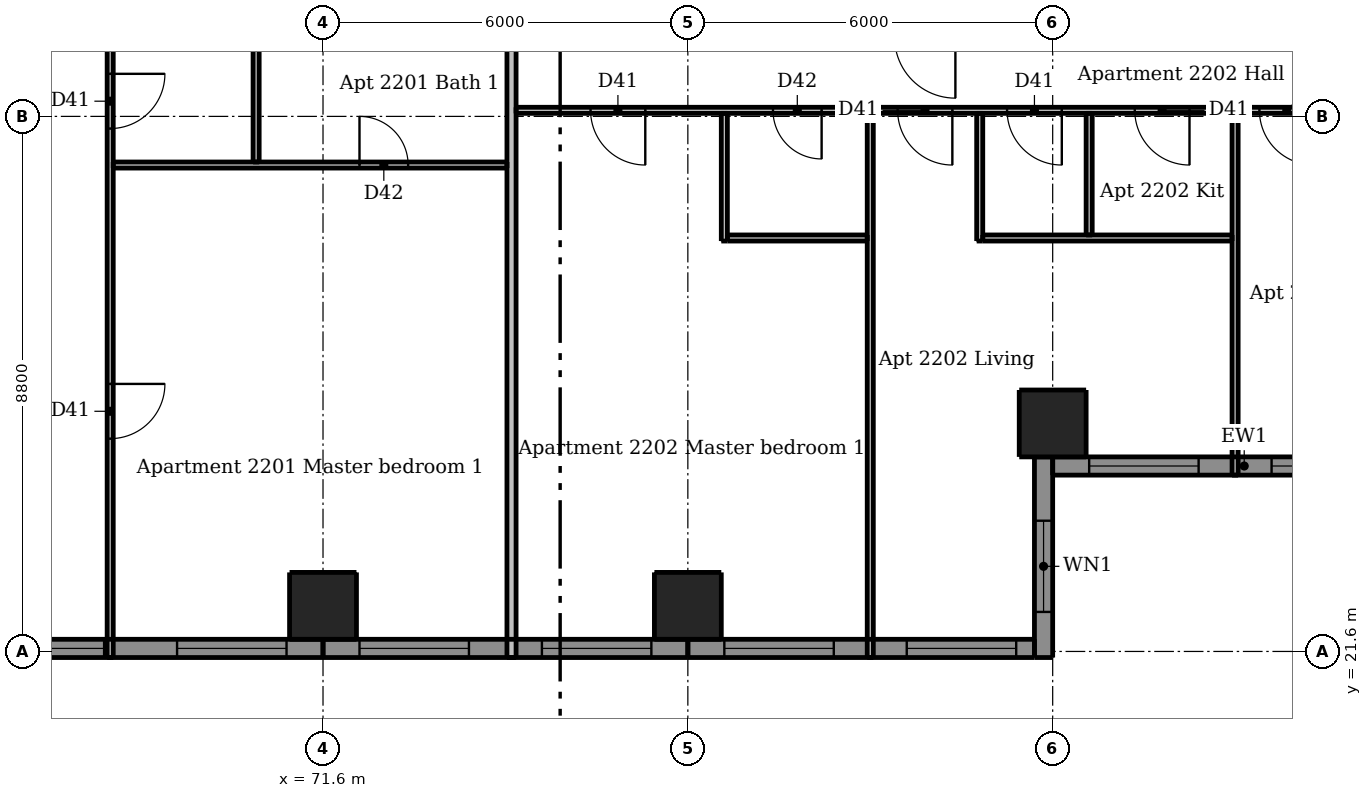
"""IFC4 building model, lengths in metres.
Left out: names, types, materials, properties, quantities, classifications, styles, units other than length and angle.
Written with IfcOpenShell. Run it as: python <this file> out.ifc"""

import sys

from ifc_helpers import new_model, si_unit, direction, frame, frame_2d, origin, origin_2d, place, context, subcontext, project, spatial, rectangle, extrude, element, fill, save


model = new_model("IFC4")
c1 = context("Model", 3, precision=1e-05, world=origin(), true_north=direction((0.0, 1.0)))
c2 = subcontext(c1, "Body", "Model", "MODEL_VIEW")
j1 = project(units=[si_unit("LENGTHUNIT", "METRE"), si_unit("PLANEANGLEUNIT", "RADIAN")], contexts=[c1])
p1 = place(None, origin())
s1 = spatial("IfcSite", under=j1, at=p1, CompositionType="ELEMENT")
p2 = place(p1, origin())
s2 = spatial("IfcBuilding", under=s1, at=p2, CompositionType="ELEMENT")
p3 = place(p2, frame((0.0, 0.0, 85.3)))
s3 = spatial("IfcBuildingStorey", under=s2, at=p3, CompositionType="ELEMENT", Elevation=85.3)
for number, where, z_axis, x_axis in (
    (1, (71.6, 22.35, 0.0), (0.0, 0.0, 1.0), (1.0, 0.0, 0.0)),
    (2, (77.6, 22.35, 0.0), (0.0, 0.0, 1.0), (1.0, 0.0, 0.0)),
    (3, (83.6, 25.35, 0.0), (0.0, 0.0, 1.0), (1.0, 0.0, 0.0)),
):
    element("IfcColumn", number, at=place(p3, frame(where, z_axis=z_axis, x_axis=x_axis)), inside=s3, PredefinedType="COLUMN", context=c2, shape_type="SweptSolid", body=[
        extrude(rectangle(XDim=1.1, YDim=1.1, at=origin_2d()), origin(), (0.0, 0.0, 1.0), 3.05),
    ])
p4 = place(p3, frame((83.45, 21.5, 0.0), z_axis=(0.0, 0.0, 1.0), x_axis=(0.0, 1.0, 0.0)))
e4 = element("IfcWall", 4, at=p4, inside=s3, PredefinedType="SOLIDWALL", context=c2, shape_type="SweptSolid", body=[
    extrude(rectangle(XDim=3.3, YDim=0.3, at=frame_2d((1.65, 0.0))), origin(), (0.0, 0.0, 1.0), 3.05),
])
p5 = place(p4, frame((0.75, 0.0, 0.9)))
e5 = element("IfcOpeningElement", 5, at=p5, cuts=e4, PredefinedType="OPENING", context=c2, shape_type="SweptSolid", body=[
    extrude(rectangle(XDim=1.5, YDim=1.5, at=frame_2d((0.75, 0.75))), frame((0.0, 0.16, 0.0), z_axis=(0.0, -1.0, 0.0), x_axis=(1.0, 0.0, 0.0)), (0.0, 0.0, 1.0), 0.32),
])
p6 = place(p3, frame((65.6, 21.65, 0.0), z_axis=(0.0, 0.0, 1.0), x_axis=(1.0, 0.0, 0.0)))
e6 = element("IfcWall", 6, at=p6, inside=s3, PredefinedType="SOLIDWALL", context=c2, shape_type="SweptSolid", body=[
    extrude(rectangle(XDim=6.0, YDim=0.3, at=frame_2d((3.0, 0.0))), origin(), (0.0, 0.0, 1.0), 3.05),
])
p7 = place(p6, frame((0.6, 0.0, 0.15)))
e7 = element("IfcOpeningElement", 7, at=p7, cuts=e6, PredefinedType="OPENING", context=c2, shape_type="SweptSolid", body=[
    extrude(rectangle(XDim=1.8, YDim=2.1, at=frame_2d((0.9, 1.05))), frame((0.0, 0.16, 0.0), z_axis=(0.0, -1.0, 0.0), x_axis=(1.0, 0.0, 0.0)), (0.0, 0.0, 1.0), 0.32),
])
p8 = place(p6, frame((3.6, 0.0, 0.15)))
e8 = element("IfcOpeningElement", 8, at=p8, cuts=e6, PredefinedType="OPENING", context=c2, shape_type="SweptSolid", body=[
    extrude(rectangle(XDim=1.8, YDim=2.1, at=frame_2d((0.9, 1.05))), frame((0.0, 0.16, 0.0), z_axis=(0.0, -1.0, 0.0), x_axis=(1.0, 0.0, 0.0)), (0.0, 0.0, 1.0), 0.32),
])
p9 = place(p3, frame((71.6, 21.65, 0.0), z_axis=(0.0, 0.0, 1.0), x_axis=(1.0, 0.0, 0.0)))
e9 = element("IfcWall", 9, at=p9, inside=s3, PredefinedType="SOLIDWALL", context=c2, shape_type="SweptSolid", body=[
    extrude(rectangle(XDim=6.0, YDim=0.3, at=frame_2d((3.0, 0.0))), origin(), (0.0, 0.0, 1.0), 3.05),
])
p10 = place(p9, frame((0.6, 0.0, 0.15)))
e10 = element("IfcOpeningElement", 10, at=p10, cuts=e9, PredefinedType="OPENING", context=c2, shape_type="SweptSolid", body=[
    extrude(rectangle(XDim=1.8, YDim=2.1, at=frame_2d((0.9, 1.05))), frame((0.0, 0.16, 0.0), z_axis=(0.0, -1.0, 0.0), x_axis=(1.0, 0.0, 0.0)), (0.0, 0.0, 1.0), 0.32),
])
p11 = place(p9, frame((3.6, 0.0, 0.15)))
e11 = element("IfcOpeningElement", 11, at=p11, cuts=e9, PredefinedType="OPENING", context=c2, shape_type="SweptSolid", body=[
    extrude(rectangle(XDim=1.8, YDim=2.1, at=frame_2d((0.9, 1.05))), frame((0.0, 0.16, 0.0), z_axis=(0.0, -1.0, 0.0), x_axis=(1.0, 0.0, 0.0)), (0.0, 0.0, 1.0), 0.32),
])
p12 = place(p3, frame((77.6, 21.65, 0.0), z_axis=(0.0, 0.0, 1.0), x_axis=(1.0, 0.0, 0.0)))
e12 = element("IfcWall", 12, at=p12, inside=s3, PredefinedType="SOLIDWALL", context=c2, shape_type="SweptSolid", body=[
    extrude(rectangle(XDim=5.7, YDim=0.3, at=frame_2d((2.85, 0.0))), origin(), (0.0, 0.0, 1.0), 3.05),
])
p13 = place(p12, frame((0.6, 0.0, 0.15)))
e13 = element("IfcOpeningElement", 13, at=p13, cuts=e12, PredefinedType="OPENING", context=c2, shape_type="SweptSolid", body=[
    extrude(rectangle(XDim=1.8, YDim=2.1, at=frame_2d((0.9, 1.05))), frame((0.0, 0.16, 0.0), z_axis=(0.0, -1.0, 0.0), x_axis=(1.0, 0.0, 0.0)), (0.0, 0.0, 1.0), 0.32),
])
p14 = place(p12, frame((3.6, 0.0, 0.15)))
e14 = element("IfcOpeningElement", 14, at=p14, cuts=e12, PredefinedType="OPENING", context=c2, shape_type="SweptSolid", body=[
    extrude(rectangle(XDim=1.8, YDim=2.1, at=frame_2d((0.9, 1.05))), frame((0.0, 0.16, 0.0), z_axis=(0.0, -1.0, 0.0), x_axis=(1.0, 0.0, 0.0)), (0.0, 0.0, 1.0), 0.32),
])
p15 = place(p3, frame((83.6, 24.65, 0.0), z_axis=(0.0, 0.0, 1.0), x_axis=(1.0, 0.0, 0.0)))
e15 = element("IfcWall", 15, at=p15, inside=s3, PredefinedType="SOLIDWALL", context=c2, shape_type="SweptSolid", body=[
    extrude(rectangle(XDim=6.3, YDim=0.3, at=frame_2d((3.15, 0.0))), origin(), (0.0, 0.0, 1.0), 3.05),
])
p16 = place(p15, frame((0.6, 0.0, 0.15)))
e16 = element("IfcOpeningElement", 16, at=p16, cuts=e15, PredefinedType="OPENING", context=c2, shape_type="SweptSolid", body=[
    extrude(rectangle(XDim=1.8, YDim=2.1, at=frame_2d((0.9, 1.05))), frame((0.0, 0.16, 0.0), z_axis=(0.0, -1.0, 0.0), x_axis=(1.0, 0.0, 0.0)), (0.0, 0.0, 1.0), 0.32),
])
p17 = place(p15, frame((3.6, 0.0, 0.15)))
e17 = element("IfcOpeningElement", 17, at=p17, cuts=e15, PredefinedType="OPENING", context=c2, shape_type="SweptSolid", body=[
    extrude(rectangle(XDim=1.8, YDim=2.1, at=frame_2d((0.9, 1.05))), frame((0.0, 0.16, 0.0), z_axis=(0.0, -1.0, 0.0), x_axis=(1.0, 0.0, 0.0)), (0.0, 0.0, 1.0), 0.32),
])
p18 = place(p3, frame((68.1, 31.625, 0.0), z_axis=(0.0, 0.0, 1.0), x_axis=(0.0, -1.0, 0.0)))
e18 = element("IfcWall", 18, at=p18, inside=s3, PredefinedType="PARTITIONING", context=c2, shape_type="SweptSolid", body=[
    extrude(rectangle(XDim=10.125, YDim=0.1, at=frame_2d((5.062, 0.0))), origin(), (0.0, 0.0, 1.0), 3.05),
])
p19 = place(p18, frame((0.525, 0.0, 0.0)))
e19 = element("IfcOpeningElement", 19, at=p19, cuts=e18, PredefinedType="OPENING", context=c2, shape_type="SweptSolid", body=[
    extrude(rectangle(XDim=0.9, YDim=2.1, at=frame_2d((0.45, 1.05))), frame((0.0, 0.06, 0.0), z_axis=(0.0, -1.0, 0.0), x_axis=(1.0, 0.0, 0.0)), (0.0, 0.0, 1.0), 0.12),
])
p20 = place(p18, frame((5.625, 0.0, 0.0)))
e20 = element("IfcOpeningElement", 20, at=p20, cuts=e18, PredefinedType="OPENING", context=c2, shape_type="SweptSolid", body=[
    extrude(rectangle(XDim=0.9, YDim=2.1, at=frame_2d((0.45, 1.05))), frame((0.0, 0.06, 0.0), z_axis=(0.0, -1.0, 0.0), x_axis=(1.0, 0.0, 0.0)), (0.0, 0.0, 1.0), 0.12),
])
p21 = place(p3, frame((70.5, 29.65, 0.0), z_axis=(0.0, 0.0, 1.0), x_axis=(0.0, 1.0, 0.0)))
e21 = element("IfcWall", 21, at=p21, inside=s3, PredefinedType="PARTITIONING", context=c2, shape_type="SweptSolid", body=[
    extrude(rectangle(XDim=1.975, YDim=0.1, at=frame_2d((0.988, 0.0))), origin(), (0.0, 0.0, 1.0), 3.05),
])
p22 = place(p3, frame((78.2, 28.35, 0.0), z_axis=(0.0, 0.0, 1.0), x_axis=(0.0, 1.0, 0.0)))
e22 = element("IfcWall", 22, at=p22, inside=s3, PredefinedType="PARTITIONING", context=c2, shape_type="SweptSolid", body=[
    extrude(rectangle(XDim=2.1, YDim=0.1, at=frame_2d((1.05, 0.0))), origin(), (0.0, 0.0, 1.0), 3.05),
])
p23 = place(p3, frame((80.6, 21.5, 0.0), z_axis=(0.0, 0.0, 1.0), x_axis=(0.0, 1.0, 0.0)))
e23 = element("IfcWall", 23, at=p23, inside=s3, PredefinedType="PARTITIONING", context=c2, shape_type="SweptSolid", body=[
    extrude(rectangle(XDim=8.95, YDim=0.1, at=frame_2d((4.475, 0.0))), origin(), (0.0, 0.0, 1.0), 3.05),
])
p24 = place(p3, frame((82.4, 28.35, 0.0), z_axis=(0.0, 0.0, 1.0), x_axis=(0.0, 1.0, 0.0)))
e24 = element("IfcWall", 24, at=p24, inside=s3, PredefinedType="PARTITIONING", context=c2, shape_type="SweptSolid", body=[
    extrude(rectangle(XDim=2.1, YDim=0.1, at=frame_2d((1.05, 0.0))), origin(), (0.0, 0.0, 1.0), 3.05),
])
p25 = place(p3, frame((84.2, 28.45, 0.0), z_axis=(0.0, 0.0, 1.0), x_axis=(0.0, 1.0, 0.0)))
e25 = element("IfcWall", 25, at=p25, inside=s3, PredefinedType="PARTITIONING", context=c2, shape_type="SweptSolid", body=[
    extrude(rectangle(XDim=2.0, YDim=0.1, at=frame_2d((1.0, 0.0))), origin(), (0.0, 0.0, 1.0), 3.05),
])
p26 = place(p3, frame((86.6, 24.5, 0.0), z_axis=(0.0, 0.0, 1.0), x_axis=(0.0, 1.0, 0.0)))
e26 = element("IfcWall", 26, at=p26, inside=s3, PredefinedType="PARTITIONING", context=c2, shape_type="SweptSolid", body=[
    extrude(rectangle(XDim=5.95, YDim=0.1, at=frame_2d((2.975, 0.0))), origin(), (0.0, 0.0, 1.0), 3.05),
])
p27 = place(p3, frame((88.25, 30.5, 0.0), z_axis=(0.0, 0.0, 1.0), x_axis=(-1.0, 0.0, 0.0)))
e27 = element("IfcWall", 27, at=p27, inside=s3, PredefinedType="PARTITIONING", context=c2, shape_type="SweptSolid", body=[
    extrude(rectangle(XDim=13.475, YDim=0.1, at=frame_2d((6.738, 0.0))), origin(), (0.0, 0.0, 1.0), 3.05),
])
p28 = place(p27, frame((6.3, 0.0, 0.0)))
e28 = element("IfcOpeningElement", 28, at=p28, cuts=e27, PredefinedType="OPENING", context=c2, shape_type="SweptSolid", body=[
    extrude(rectangle(XDim=0.9, YDim=2.1, at=frame_2d((0.45, 1.05))), frame((0.0, 0.06, 0.0), z_axis=(0.0, -1.0, 0.0), x_axis=(1.0, 0.0, 0.0)), (0.0, 0.0, 1.0), 0.12),
])
p29 = place(p27, frame((2.4, 0.0, 0.0)))
e29 = element("IfcOpeningElement", 29, at=p29, cuts=e27, PredefinedType="OPENING", context=c2, shape_type="SweptSolid", body=[
    extrude(rectangle(XDim=0.9, YDim=2.1, at=frame_2d((0.45, 1.05))), frame((0.0, 0.06, 0.0), z_axis=(0.0, -1.0, 0.0), x_axis=(1.0, 0.0, 0.0)), (0.0, 0.0, 1.0), 0.12),
])
p30 = place(p27, frame((4.5, 0.0, 0.0)))
e30 = element("IfcOpeningElement", 30, at=p30, cuts=e27, PredefinedType="OPENING", context=c2, shape_type="SweptSolid", body=[
    extrude(rectangle(XDim=0.9, YDim=2.1, at=frame_2d((0.45, 1.05))), frame((0.0, 0.06, 0.0), z_axis=(0.0, -1.0, 0.0), x_axis=(1.0, 0.0, 0.0)), (0.0, 0.0, 1.0), 0.12),
])
p31 = place(p27, frame((11.35, 0.0, 0.0)))
e31 = element("IfcOpeningElement", 31, at=p31, cuts=e27, PredefinedType="OPENING", context=c2, shape_type="SweptSolid", body=[
    extrude(rectangle(XDim=0.9, YDim=2.1, at=frame_2d((0.45, 1.05))), frame((0.0, 0.06, 0.0), z_axis=(0.0, -1.0, 0.0), x_axis=(1.0, 0.0, 0.0)), (0.0, 0.0, 1.0), 0.12),
])
p32 = place(p27, frame((0.35, 0.0, 0.0)))
e32 = element("IfcOpeningElement", 32, at=p32, cuts=e27, PredefinedType="OPENING", context=c2, shape_type="SweptSolid", body=[
    extrude(rectangle(XDim=0.9, YDim=2.1, at=frame_2d((0.45, 1.05))), frame((0.0, 0.06, 0.0), z_axis=(0.0, -1.0, 0.0), x_axis=(1.0, 0.0, 0.0)), (0.0, 0.0, 1.0), 0.12),
])
p33 = place(p27, frame((8.45, 0.0, 0.0)))
e33 = element("IfcOpeningElement", 33, at=p33, cuts=e27, PredefinedType="OPENING", context=c2, shape_type="SweptSolid", body=[
    extrude(rectangle(XDim=0.8, YDim=2.1, at=frame_2d((0.4, 1.05))), frame((0.0, 0.06, 0.0), z_axis=(0.0, -1.0, 0.0), x_axis=(1.0, 0.0, 0.0)), (0.0, 0.0, 1.0), 0.12),
])
p34 = place(p3, frame((68.15, 29.6, 0.0), z_axis=(0.0, 0.0, 1.0), x_axis=(1.0, 0.0, 0.0)))
e34 = element("IfcWall", 34, at=p34, inside=s3, PredefinedType="PARTITIONING", context=c2, shape_type="SweptSolid", body=[
    extrude(rectangle(XDim=6.475, YDim=0.1, at=frame_2d((3.238, 0.0))), origin(), (0.0, 0.0, 1.0), 3.05),
])
p35 = place(p34, frame((4.05, 0.0, 0.0)))
e35 = element("IfcOpeningElement", 35, at=p35, cuts=e34, PredefinedType="OPENING", context=c2, shape_type="SweptSolid", body=[
    extrude(rectangle(XDim=0.8, YDim=2.1, at=frame_2d((0.4, 1.05))), frame((0.0, 0.06, 0.0), z_axis=(0.0, -1.0, 0.0), x_axis=(1.0, 0.0, 0.0)), (0.0, 0.0, 1.0), 0.12),
])
p36 = place(p3, frame((78.25, 28.4, 0.0), z_axis=(0.0, 0.0, 1.0), x_axis=(1.0, 0.0, 0.0)))
e36 = element("IfcWall", 36, at=p36, inside=s3, PredefinedType="PARTITIONING", context=c2, shape_type="SweptSolid", body=[
    extrude(rectangle(XDim=2.3, YDim=0.1, at=frame_2d((1.15, 0.0))), origin(), (0.0, 0.0, 1.0), 3.05),
])
p37 = place(p3, frame((82.45, 28.4, 0.0), z_axis=(0.0, 0.0, 1.0), x_axis=(1.0, 0.0, 0.0)))
e37 = element("IfcWall", 37, at=p37, inside=s3, PredefinedType="PARTITIONING", context=c2, shape_type="SweptSolid", body=[
    extrude(rectangle(XDim=4.1, YDim=0.1, at=frame_2d((2.05, 0.0))), origin(), (0.0, 0.0, 1.0), 3.05),
])
p38 = place(p3, frame((74.7, 21.5, 0.0), z_axis=(0.0, 0.0, 1.0), x_axis=(0.0, 1.0, 0.0)))
e38 = element("IfcWall", 38, at=p38, inside=s3, PredefinedType="PARTITIONING", context=c2, shape_type="SweptSolid", body=[
    extrude(rectangle(XDim=10.125, YDim=0.15, at=frame_2d((5.062, 0.0))), origin(), (0.0, 0.0, 1.0), 3.05),
])
p39 = place(p5, origin())
e39 = element("IfcWindow", 39, at=p39, inside=s3, PartitioningType="DOUBLE_PANEL_VERTICAL", PredefinedType="WINDOW", context=c2, shape_type="SweptSolid", body=[
    extrude(rectangle(XDim=1.5, YDim=1.5, at=frame_2d((0.75, 0.75))), frame((0.0, 0.03, 0.0), z_axis=(0.0, -1.0, 0.0), x_axis=(1.0, 0.0, 0.0)), (0.0, 0.0, 1.0), 0.06),
])
fill(e5, e39)
p40 = place(p7, origin())
e40 = element("IfcWindow", 40, at=p40, inside=s3, PartitioningType="DOUBLE_PANEL_VERTICAL", PredefinedType="WINDOW", context=c2, shape_type="SweptSolid", body=[
    extrude(rectangle(XDim=1.8, YDim=2.1, at=frame_2d((0.9, 1.05))), frame((0.0, 0.03, 0.0), z_axis=(0.0, -1.0, 0.0), x_axis=(1.0, 0.0, 0.0)), (0.0, 0.0, 1.0), 0.06),
])
fill(e7, e40)
p41 = place(p8, origin())
e41 = element("IfcWindow", 41, at=p41, inside=s3, PartitioningType="DOUBLE_PANEL_VERTICAL", PredefinedType="WINDOW", context=c2, shape_type="SweptSolid", body=[
    extrude(rectangle(XDim=1.8, YDim=2.1, at=frame_2d((0.9, 1.05))), frame((0.0, 0.03, 0.0), z_axis=(0.0, -1.0, 0.0), x_axis=(1.0, 0.0, 0.0)), (0.0, 0.0, 1.0), 0.06),
])
fill(e8, e41)
p42 = place(p10, origin())
e42 = element("IfcWindow", 42, at=p42, inside=s3, PartitioningType="DOUBLE_PANEL_VERTICAL", PredefinedType="WINDOW", context=c2, shape_type="SweptSolid", body=[
    extrude(rectangle(XDim=1.8, YDim=2.1, at=frame_2d((0.9, 1.05))), frame((0.0, 0.03, 0.0), z_axis=(0.0, -1.0, 0.0), x_axis=(1.0, 0.0, 0.0)), (0.0, 0.0, 1.0), 0.06),
])
fill(e10, e42)
p43 = place(p11, origin())
e43 = element("IfcWindow", 43, at=p43, inside=s3, PartitioningType="DOUBLE_PANEL_VERTICAL", PredefinedType="WINDOW", context=c2, shape_type="SweptSolid", body=[
    extrude(rectangle(XDim=1.8, YDim=2.1, at=frame_2d((0.9, 1.05))), frame((0.0, 0.03, 0.0), z_axis=(0.0, -1.0, 0.0), x_axis=(1.0, 0.0, 0.0)), (0.0, 0.0, 1.0), 0.06),
])
fill(e11, e43)
p44 = place(p13, origin())
e44 = element("IfcWindow", 44, at=p44, inside=s3, PartitioningType="DOUBLE_PANEL_VERTICAL", PredefinedType="WINDOW", context=c2, shape_type="SweptSolid", body=[
    extrude(rectangle(XDim=1.8, YDim=2.1, at=frame_2d((0.9, 1.05))), frame((0.0, 0.03, 0.0), z_axis=(0.0, -1.0, 0.0), x_axis=(1.0, 0.0, 0.0)), (0.0, 0.0, 1.0), 0.06),
])
fill(e13, e44)
p45 = place(p14, origin())
e45 = element("IfcWindow", 45, at=p45, inside=s3, PartitioningType="DOUBLE_PANEL_VERTICAL", PredefinedType="WINDOW", context=c2, shape_type="SweptSolid", body=[
    extrude(rectangle(XDim=1.8, YDim=2.1, at=frame_2d((0.9, 1.05))), frame((0.0, 0.03, 0.0), z_axis=(0.0, -1.0, 0.0), x_axis=(1.0, 0.0, 0.0)), (0.0, 0.0, 1.0), 0.06),
])
fill(e14, e45)
p46 = place(p16, origin())
e46 = element("IfcWindow", 46, at=p46, inside=s3, PartitioningType="DOUBLE_PANEL_VERTICAL", PredefinedType="WINDOW", context=c2, shape_type="SweptSolid", body=[
    extrude(rectangle(XDim=1.8, YDim=2.1, at=frame_2d((0.9, 1.05))), frame((0.0, 0.03, 0.0), z_axis=(0.0, -1.0, 0.0), x_axis=(1.0, 0.0, 0.0)), (0.0, 0.0, 1.0), 0.06),
])
fill(e16, e46)
p47 = place(p17, origin())
e47 = element("IfcWindow", 47, at=p47, inside=s3, PartitioningType="DOUBLE_PANEL_VERTICAL", PredefinedType="WINDOW", context=c2, shape_type="SweptSolid", body=[
    extrude(rectangle(XDim=1.8, YDim=2.1, at=frame_2d((0.9, 1.05))), frame((0.0, 0.03, 0.0), z_axis=(0.0, -1.0, 0.0), x_axis=(1.0, 0.0, 0.0)), (0.0, 0.0, 1.0), 0.06),
])
fill(e17, e47)
p48 = place(p19, origin())
e48 = element("IfcDoor", 48, at=p48, inside=s3, OperationType="SINGLE_SWING_LEFT", PredefinedType="DOOR", context=c2, shape_type="SweptSolid", body=[
    extrude(rectangle(XDim=0.9, YDim=2.1, at=frame_2d((0.45, 1.05))), frame((0.0, 0.025, 0.0), z_axis=(0.0, -1.0, 0.0), x_axis=(1.0, 0.0, 0.0)), (0.0, 0.0, 1.0), 0.05),
])
fill(e19, e48)
p49 = place(p20, origin())
e49 = element("IfcDoor", 49, at=p49, inside=s3, OperationType="SINGLE_SWING_LEFT", PredefinedType="DOOR", context=c2, shape_type="SweptSolid", body=[
    extrude(rectangle(XDim=0.9, YDim=2.1, at=frame_2d((0.45, 1.05))), frame((0.0, 0.025, 0.0), z_axis=(0.0, -1.0, 0.0), x_axis=(1.0, 0.0, 0.0)), (0.0, 0.0, 1.0), 0.05),
])
fill(e20, e49)
p50 = place(p35, origin())
e50 = element("IfcDoor", 50, at=p50, inside=s3, OperationType="SINGLE_SWING_LEFT", PredefinedType="DOOR", context=c2, shape_type="SweptSolid", body=[
    extrude(rectangle(XDim=0.8, YDim=2.1, at=frame_2d((0.4, 1.05))), frame((0.0, 0.025, 0.0), z_axis=(0.0, -1.0, 0.0), x_axis=(1.0, 0.0, 0.0)), (0.0, 0.0, 1.0), 0.05),
])
fill(e35, e50)
p51 = place(p28, origin())
e51 = element("IfcDoor", 51, at=p51, inside=s3, OperationType="SINGLE_SWING_LEFT", PredefinedType="DOOR", context=c2, shape_type="SweptSolid", body=[
    extrude(rectangle(XDim=0.9, YDim=2.1, at=frame_2d((0.45, 1.05))), frame((0.0, 0.025, 0.0), z_axis=(0.0, -1.0, 0.0), x_axis=(1.0, 0.0, 0.0)), (0.0, 0.0, 1.0), 0.05),
])
fill(e28, e51)
p52 = place(p29, origin())
e52 = element("IfcDoor", 52, at=p52, inside=s3, OperationType="SINGLE_SWING_LEFT", PredefinedType="DOOR", context=c2, shape_type="SweptSolid", body=[
    extrude(rectangle(XDim=0.9, YDim=2.1, at=frame_2d((0.45, 1.05))), frame((0.0, 0.025, 0.0), z_axis=(0.0, -1.0, 0.0), x_axis=(1.0, 0.0, 0.0)), (0.0, 0.0, 1.0), 0.05),
])
fill(e29, e52)
p53 = place(p30, origin())
e53 = element("IfcDoor", 53, at=p53, inside=s3, OperationType="SINGLE_SWING_LEFT", PredefinedType="DOOR", context=c2, shape_type="SweptSolid", body=[
    extrude(rectangle(XDim=0.9, YDim=2.1, at=frame_2d((0.45, 1.05))), frame((0.0, 0.025, 0.0), z_axis=(0.0, -1.0, 0.0), x_axis=(1.0, 0.0, 0.0)), (0.0, 0.0, 1.0), 0.05),
])
fill(e30, e53)
p54 = place(p31, origin())
e54 = element("IfcDoor", 54, at=p54, inside=s3, OperationType="SINGLE_SWING_LEFT", PredefinedType="DOOR", context=c2, shape_type="SweptSolid", body=[
    extrude(rectangle(XDim=0.9, YDim=2.1, at=frame_2d((0.45, 1.05))), frame((0.0, 0.025, 0.0), z_axis=(0.0, -1.0, 0.0), x_axis=(1.0, 0.0, 0.0)), (0.0, 0.0, 1.0), 0.05),
])
fill(e31, e54)
p55 = place(p32, origin())
e55 = element("IfcDoor", 55, at=p55, inside=s3, OperationType="SINGLE_SWING_LEFT", PredefinedType="DOOR", context=c2, shape_type="SweptSolid", body=[
    extrude(rectangle(XDim=0.9, YDim=2.1, at=frame_2d((0.45, 1.05))), frame((0.0, 0.025, 0.0), z_axis=(0.0, -1.0, 0.0), x_axis=(1.0, 0.0, 0.0)), (0.0, 0.0, 1.0), 0.05),
])
fill(e32, e55)
p56 = place(p33, origin())
e56 = element("IfcDoor", 56, at=p56, inside=s3, OperationType="SINGLE_SWING_LEFT", PredefinedType="DOOR", context=c2, shape_type="SweptSolid", body=[
    extrude(rectangle(XDim=0.8, YDim=2.1, at=frame_2d((0.4, 1.05))), frame((0.0, 0.025, 0.0), z_axis=(0.0, -1.0, 0.0), x_axis=(1.0, 0.0, 0.0)), (0.0, 0.0, 1.0), 0.05),
])
fill(e33, e56)
save(model, sys.argv[1])
